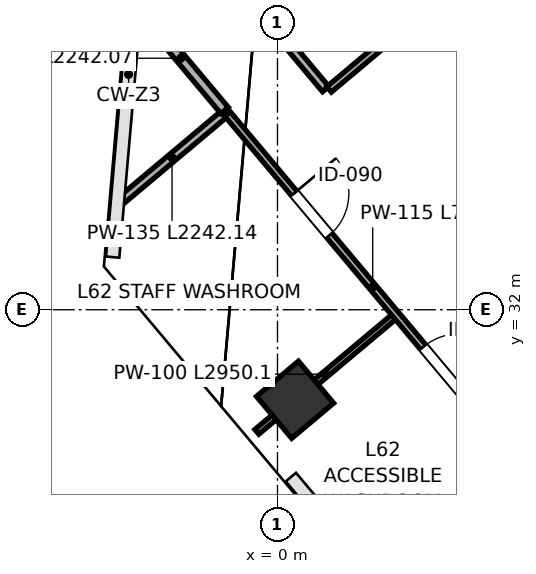
"""IFC4 building model, lengths in metres.
Left out: names, types, materials, properties, quantities, classifications, styles, units other than length and angle.
Written with IfcOpenShell. Run it as: python <this file> out.ifc"""

import sys

from ifc_helpers import new_model, si_unit, direction, frame, frame_2d, origin, origin_2d, place, context, subcontext, project, spatial, rectangle, extrude, clip, halfspace, source, transform, mapped, element, fill, save


model = new_model("IFC4")
c1 = context("Model", 3, precision=1e-05, world=origin(), true_north=direction((0.0, 1.0)))
c2 = subcontext(c1, "Body", "Model", "MODEL_VIEW")
j1 = project(units=[si_unit("LENGTHUNIT", "METRE"), si_unit("PLANEANGLEUNIT", "RADIAN")], contexts=[c1])
p1 = place(None, origin())
s1 = spatial("IfcSite", under=j1, at=p1, CompositionType="ELEMENT")
p2 = place(p1, origin())
s2 = spatial("IfcBuilding", under=s1, at=p2, CompositionType="ELEMENT")
p3 = place(p2, frame((0.0, 0.0, 275.2)))
s3 = spatial("IfcBuildingStorey", under=s2, at=p3, CompositionType="ELEMENT", Elevation=275.2)
p4 = place(p3, frame((0.289, 30.52, 0.0), z_axis=(-0.010330476679, 0.215464227867, 0.976457089565), x_axis=(0.677872400292, -0.716368043102, 0.165244775241)))
e1 = element("IfcColumn", 1, at=p4, inside=s3, PredefinedType="COLUMN", context=c2, shape_type="Clipping", body=[
    clip(clip(extrude(rectangle(XDim=0.9, YDim=0.9, at=origin_2d()), origin(), (0.0, 0.0, 1.0), 4.301), halfspace(frame((0.0, 0.0, 0.141), z_axis=(0.0, 0.0, -1.0), x_axis=(1.0, 0.0, 0.0)), False)), halfspace(frame((0.0, 0.0, 4.16), z_axis=(0.0, 0.0, 1.0), x_axis=(1.0, 0.0, 0.0)), False)),
])
p5 = place(p3, frame((-2.593, 33.78, 0.0), z_axis=(0.0, 0.0, 1.0), x_axis=(0.765994359698, 0.642847292062, 0.0)))
e2 = element("IfcWall", 2, at=p5, inside=s3, PredefinedType="PARTITIONING", context=c2, shape_type="SweptSolid", body=[
    extrude(rectangle(XDim=2.242, YDim=0.135, at=frame_2d((1.121, 0.0))), origin(), (0.0, 0.0, 1.0), 3.96),
])
p6 = place(p3, frame((-2.312, 36.995, 0.0), z_axis=(0.0, 0.0, 1.0), x_axis=(0.642783398336, -0.766047976842, 0.0)))
e3 = element("IfcWall", 3, at=p6, inside=s3, PredefinedType="PARTITIONING", context=c2, shape_type="SweptSolid", body=[
    extrude(rectangle(XDim=2.242, YDim=0.16, at=frame_2d((1.121, 0.0))), origin(), (0.0, 0.0, 1.0), 3.96),
])
p7 = place(p3, frame((-0.339, 29.992, 0.0), z_axis=(0.0, 0.0, 1.0), x_axis=(0.766025914603, 0.642809690465, 0.0)))
e4 = element("IfcWall", 4, at=p7, inside=s3, PredefinedType="PARTITIONING", context=c2, shape_type="SweptSolid", body=[
    extrude(rectangle(XDim=2.95, YDim=0.1, at=frame_2d((1.475, 0.0))), origin(), (0.0, 0.0, 1.0), 3.195),
])
p8 = place(p3, frame((1.686, 27.58, 0.0), z_axis=(0.0, 0.0, 1.0), x_axis=(0.766107411761, 0.642712559116, 0.0)))
e5 = element("IfcWall", 5, at=p8, inside=s3, PredefinedType="PARTITIONING", context=c2, shape_type="SweptSolid", body=[
    extrude(rectangle(XDim=2.95, YDim=0.135, at=frame_2d((1.475, 0.0))), origin(), (0.0, 0.0, 1.0), 3.195),
])
p9 = place(p3, frame((-0.819, 35.216, 0.0), z_axis=(0.0, 0.0, 1.0), x_axis=(0.642772999209, -0.766056702528, 0.0)))
e6 = element("IfcWall", 6, at=p9, inside=s3, PredefinedType="PARTITIONING", context=c2, shape_type="SweptSolid", body=[
    extrude(rectangle(XDim=7.42, YDim=0.115, at=frame_2d((3.71, 0.0))), origin(), (0.0, 0.0, 1.0), 3.96),
])
p10 = place(p9, frame((1.7, 0.0, 0.0)))
e7 = element("IfcOpeningElement", 7, at=p10, cuts=e6, PredefinedType="OPENING", context=c2, shape_type="SweptSolid", body=[
    extrude(rectangle(XDim=0.9, YDim=2.15, at=frame_2d((0.45, 1.075))), frame((0.0, 0.067, 0.0), z_axis=(0.0, -1.0, 0.0), x_axis=(1.0, 0.0, 0.0)), (0.0, 0.0, 1.0), 0.135),
])
p11 = place(p9, frame((5.0, 0.0, 0.0)))
e8 = element("IfcOpeningElement", 8, at=p11, cuts=e6, PredefinedType="OPENING", context=c2, shape_type="SweptSolid", body=[
    extrude(rectangle(XDim=0.95, YDim=2.15, at=frame_2d((0.475, 1.075))), frame((0.0, 0.067, 0.0), z_axis=(0.0, -1.0, 0.0), x_axis=(1.0, 0.0, 0.0)), (0.0, 0.0, 1.0), 0.135),
])
p12 = place(p3, frame((-2.055, 39.022, 0.0), z_axis=(0.0, 0.0, 1.0), x_axis=(0.642777132802, -0.766053234147, 0.0)))
e9 = element("IfcWall", 9, at=p12, inside=s3, PredefinedType="PARTITIONING", context=c2, shape_type="SweptSolid", body=[
    extrude(rectangle(XDim=4.43, YDim=0.135, at=frame_2d((2.215, 0.0))), origin(), (0.0, 0.0, 1.0), 3.96),
])
p13 = place(p3, frame((0.849, 35.624, 0.0), z_axis=(0.0, 0.0, 1.0), x_axis=(0.766042777978, 0.642789594119, 0.0)))
e10 = element("IfcWall", 10, at=p13, inside=s3, PredefinedType="PARTITIONING", context=c2, shape_type="SweptSolid", body=[
    extrude(rectangle(XDim=29.51, YDim=0.115, at=frame_2d((14.755, 0.0))), origin(), (0.0, 0.0, 1.0), 3.96),
])
p14 = place(p13, frame((2.6, 0.0, 0.0)))
e11 = element("IfcOpeningElement", 11, at=p14, cuts=e10, PredefinedType="OPENING", context=c2, shape_type="SweptSolid", body=[
    extrude(rectangle(XDim=0.95, YDim=2.15, at=frame_2d((0.475, 1.075))), frame((0.0, 0.067, 0.0), z_axis=(0.0, -1.0, 0.0), x_axis=(1.0, 0.0, 0.0)), (0.0, 0.0, 1.0), 0.135),
])
m1 = source(origin(), c2, "Body", "SweptSolid", [
    extrude(rectangle(XDim=0.9, YDim=2.15, at=frame_2d((0.45, 1.075))), frame((0.0, 0.025, 0.0), z_axis=(0.0, -1.0, 0.0), x_axis=(1.0, 0.0, 0.0)), (0.0, 0.0, 1.0), 0.05),
])
p15 = place(p10, origin())
e12 = element("IfcDoor", 12, at=p15, inside=s3, OperationType="SINGLE_SWING_LEFT", PredefinedType="DOOR", context=c2, shape_type="MappedRepresentation", body=[
    mapped(m1, transform((0.0, 0.0, 0.0), scale=1.0)),
])
fill(e7, e12)
m2 = source(origin(), c2, "Body", "SweptSolid", [
    extrude(rectangle(XDim=0.95, YDim=2.15, at=frame_2d((0.475, 1.075))), frame((0.0, 0.025, 0.0), z_axis=(0.0, -1.0, 0.0), x_axis=(1.0, 0.0, 0.0)), (0.0, 0.0, 1.0), 0.05),
])
p16 = place(p11, origin())
e13 = element("IfcDoor", 13, at=p16, inside=s3, OperationType="SINGLE_SWING_RIGHT", PredefinedType="DOOR", context=c2, shape_type="MappedRepresentation", body=[
    mapped(m2, transform((0.0, 0.0, 0.0), scale=1.0)),
])
fill(e8, e13)
save(model, sys.argv[1])
